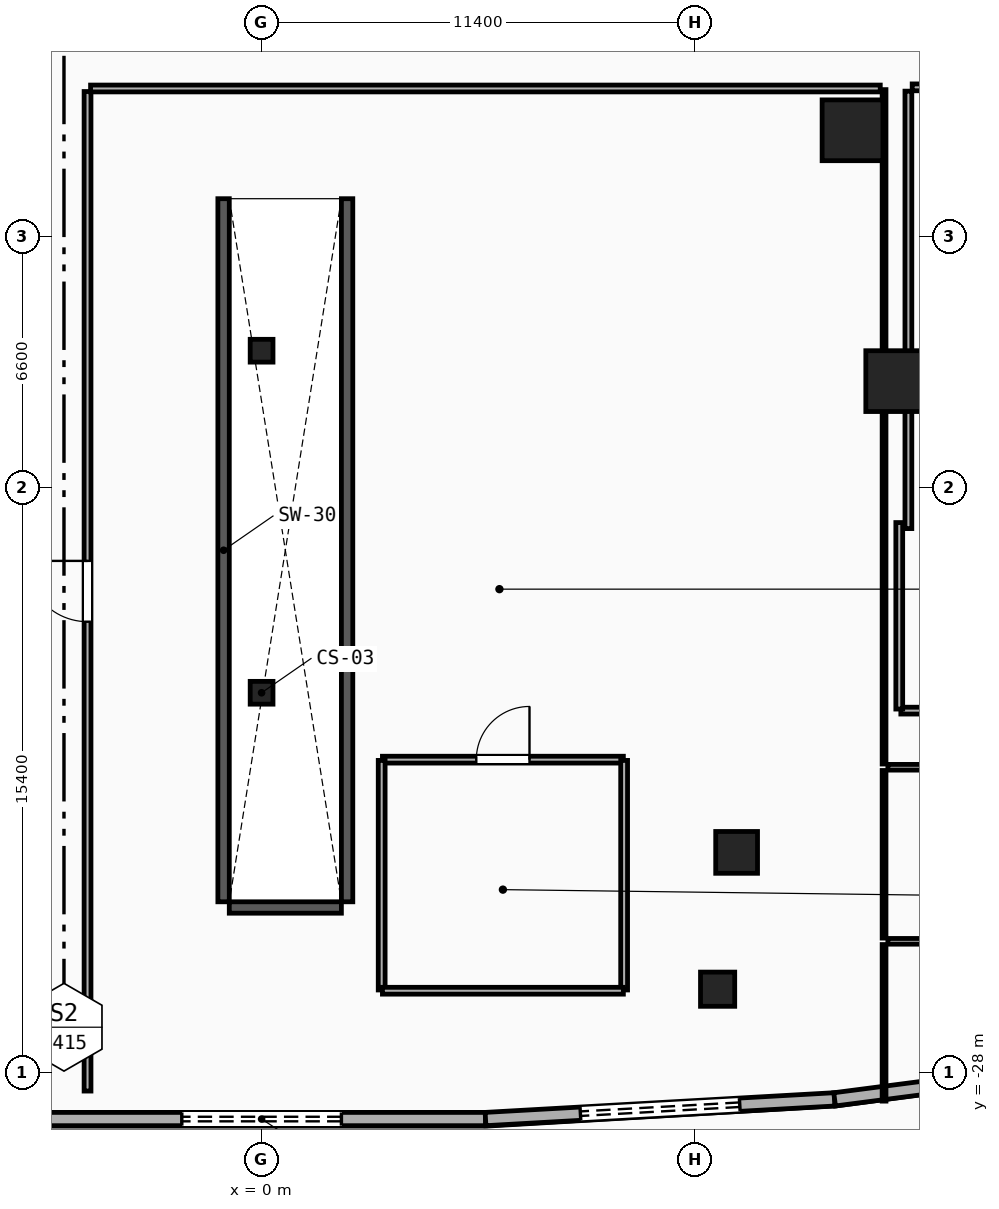
"""IFC4 building model, lengths in metres.
Left out: names, types, materials, properties, quantities, classifications, styles, units other than length and angle.
Written with IfcOpenShell. Run it as: python <this file> out.ifc"""

import sys

from ifc_helpers import new_model, si_unit, direction, frame, frame_2d, origin, origin_2d, place, context, subcontext, project, spatial, rectangle, hollow_rectangle, circle, extrude, element, fill, save


model = new_model("IFC4")
c1 = context("Model", 3, precision=1e-05, world=origin(), true_north=direction((0.0, 1.0)))
c2 = subcontext(c1, "Body", "Model", "MODEL_VIEW")
j1 = project(units=[si_unit("LENGTHUNIT", "METRE"), si_unit("PLANEANGLEUNIT", "RADIAN")], contexts=[c1])
p1 = place(None, origin())
s1 = spatial("IfcSite", under=j1, at=p1, CompositionType="ELEMENT")
p2 = place(p1, origin())
s2 = spatial("IfcBuilding", under=s1, at=p2, CompositionType="ELEMENT")
p3 = place(p2, origin())
s3 = spatial("IfcBuildingStorey", under=s2, at=p3, CompositionType="ELEMENT", Elevation=0.0)
for number, where, z_axis, x_axis in (
    (1, (15.55, -3.2, 0.0), (0.0, 0.0, 1.0), (1.0, 0.0, 0.0)),
    (2, (16.7, -9.8, 0.0), (0.0, 0.0, 1.0), (1.0, 0.0, 0.0)),
):
    element("IfcColumn", number, at=place(p3, frame(where, z_axis=z_axis, x_axis=x_axis)), inside=s3, PredefinedType="COLUMN", context=c2, shape_type="SweptSolid", body=[
        extrude(rectangle(XDim=1.6, YDim=1.6, at=origin_2d()), origin(), (0.0, 0.0, 1.0), 6.0),
    ])
for number, where, z_axis, x_axis in (
    (3, (0.0, -18.0, 0.0), (0.0, 0.0, 1.0), (1.0, 0.0, 0.0)),
    (4, (0.0, -9.0, 0.0), (0.0, 0.0, 1.0), (1.0, 0.0, 0.0)),
):
    element("IfcColumn", number, at=place(p3, frame(where, z_axis=z_axis, x_axis=x_axis)), inside=s3, PredefinedType="COLUMN", context=c2, shape_type="SweptSolid", body=[
        extrude(hollow_rectangle(XDim=0.6, YDim=0.6, WallThickness=0.032, at=origin_2d()), origin(), (0.0, 0.0, 1.0), 6.0),
    ])
p4 = place(p3, frame((12.5, -22.2, 0.0), z_axis=(0.0, 0.0, 1.0), x_axis=(1.0, 0.0, 0.0)))
e5 = element("IfcColumn", 5, at=p4, inside=s3, PredefinedType="PILASTER", context=c2, shape_type="SweptSolid", body=[
    extrude(circle(Radius=0.55, at=origin_2d()), origin(), (0.0, 0.0, 1.0), 6.0),
])
p5 = place(p3, frame((12.0, -25.8, 0.0), z_axis=(0.0, 0.0, 1.0), x_axis=(1.0, 0.0, 0.0)))
e6 = element("IfcColumn", 6, at=p5, inside=s3, PredefinedType="COLUMN", context=c2, shape_type="SweptSolid", body=[
    extrude(rectangle(XDim=0.9, YDim=0.9, at=origin_2d()), origin(), (0.0, 0.0, 1.0), 5.65),
])
for number, where, z_axis, x_axis in (
    (7, (-1.0, -23.5, 0.0), (0.0, 0.0, 1.0), (0.0, 1.0, 0.0)),
    (8, (2.25, -23.5, 0.0), (0.0, 0.0, 1.0), (0.0, 1.0, 0.0)),
):
    element("IfcWall", number, at=place(p3, frame(where, z_axis=z_axis, x_axis=x_axis)), inside=s3, PredefinedType="SHEAR", context=c2, shape_type="SweptSolid", body=[
        extrude(rectangle(XDim=18.5, YDim=0.3, at=frame_2d((9.25, 0.0))), origin(), (0.0, 0.0, 1.0), 5.65),
    ])
p6 = place(p3, frame((-0.85, -23.65, 0.0), z_axis=(0.0, 0.0, 1.0), x_axis=(1.0, 0.0, 0.0)))
e9 = element("IfcWall", 9, at=p6, inside=s3, PredefinedType="SHEAR", context=c2, shape_type="SweptSolid", body=[
    extrude(rectangle(XDim=2.95, YDim=0.3, at=frame_2d((1.475, 0.0))), origin(), (0.0, 0.0, 1.0), 5.65),
])
p7 = place(p3, frame((5.893, -29.216, 0.0), z_axis=(0.0, 0.0, 1.0), x_axis=(-1.0, 0.0, 0.0)))
e10 = element("IfcWall", 10, at=p7, inside=s3, PredefinedType="SOLIDWALL", context=c2, shape_type="SweptSolid", body=[
    extrude(rectangle(XDim=11.785, YDim=0.35, at=frame_2d((5.893, 0.0))), origin(), (0.0, 0.0, 1.0), 5.65),
])
p8 = place(p7, frame((3.792, 0.0, 0.0)))
e11 = element("IfcOpeningElement", 11, at=p8, cuts=e10, PredefinedType="OPENING", context=c2, shape_type="SweptSolid", body=[
    extrude(rectangle(XDim=4.2, YDim=2.8, at=frame_2d((2.1, 1.4))), frame((0.0, 0.185, 0.0), z_axis=(0.0, -1.0, 0.0), x_axis=(1.0, 0.0, 0.0)), (0.0, 0.0, 1.0), 0.37),
])
p9 = place(p3, frame((15.079, -28.698, 0.0), z_axis=(0.0, 0.0, 1.0), x_axis=(-0.998413463137, -0.056307695976, 0.0)))
e12 = element("IfcWall", 12, at=p9, inside=s3, PredefinedType="SOLIDWALL", context=c2, shape_type="SweptSolid", body=[
    extrude(rectangle(XDim=9.201, YDim=0.35, at=frame_2d((4.6, 0.0))), origin(), (0.0, 0.0, 1.0), 5.65),
])
p10 = place(p9, frame((2.5, 0.0, 0.0)))
e13 = element("IfcOpeningElement", 13, at=p10, cuts=e12, PredefinedType="OPENING", context=c2, shape_type="SweptSolid", body=[
    extrude(rectangle(XDim=4.2, YDim=2.8, at=frame_2d((2.1, 1.4))), frame((0.0, 0.185, 0.0), z_axis=(0.0, -1.0, 0.0), x_axis=(1.0, 0.0, 0.0)), (0.0, 0.0, 1.0), 0.37),
])
p11 = place(p3, frame((23.14, -27.652, 0.0), z_axis=(0.0, 0.0, 1.0), x_axis=(-0.991688106477, -0.128665067026, 0.0)))
e14 = element("IfcWall", 14, at=p11, inside=s3, PredefinedType="SOLIDWALL", context=c2, shape_type="SweptSolid", body=[
    extrude(rectangle(XDim=8.129, YDim=0.35, at=frame_2d((4.064, 0.0))), origin(), (0.0, 0.0, 1.0), 5.65),
])
p12 = place(p3, frame((17.02, -13.68, 0.0), z_axis=(0.0, 0.0, 1.0), x_axis=(0.0, 1.0, 0.0)))
e15 = element("IfcWall", 15, at=p12, inside=s3, PredefinedType="PARTITIONING", context=c2, shape_type="SweptSolid", body=[
    extrude(rectangle(XDim=11.51, YDim=0.18, at=frame_2d((5.755, 0.0))), origin(), (0.0, 0.0, 1.0), 5.65),
])
p13 = place(p3, frame((17.12, -2.07, 0.0), z_axis=(0.0, 0.0, 1.0), x_axis=(1.0, 0.0, 0.0)))
e16 = element("IfcWall", 16, at=p13, inside=s3, PredefinedType="PARTITIONING", context=c2, shape_type="SweptSolid", body=[
    extrude(rectangle(XDim=3.75, YDim=0.18, at=frame_2d((1.875, 0.0))), origin(), (0.0, 0.0, 1.0), 5.65),
])
p14 = place(p13, frame((1.4, 0.0, 0.0)))
e17 = element("IfcOpeningElement", 17, at=p14, cuts=e16, PredefinedType="OPENING", context=c2, shape_type="SweptSolid", body=[
    extrude(rectangle(XDim=0.95, YDim=2.1, at=frame_2d((0.475, 1.05))), frame((0.0, 0.1, 0.0), z_axis=(0.0, -1.0, 0.0), x_axis=(1.0, 0.0, 0.0)), (0.0, 0.0, 1.0), 0.2),
])
p15 = place(p3, frame((16.48, -19.96, 0.0), z_axis=(0.0, 0.0, 1.0), x_axis=(1.0, 0.0, 0.0)))
e18 = element("IfcWall", 18, at=p15, inside=s3, PredefinedType="PARTITIONING", context=c2, shape_type="SweptSolid", body=[
    extrude(rectangle(XDim=7.04, YDim=0.15, at=frame_2d((3.52, 0.0))), origin(), (0.0, 0.0, 1.0), 5.65),
])
p16 = place(p15, frame((3.02, 0.0, 0.0)))
e19 = element("IfcOpeningElement", 19, at=p16, cuts=e18, PredefinedType="OPENING", context=c2, shape_type="SweptSolid", body=[
    extrude(rectangle(XDim=1.0, YDim=2.15, at=frame_2d((0.5, 1.075))), frame((0.0, 0.085, 0.0), z_axis=(0.0, -1.0, 0.0), x_axis=(1.0, 0.0, 0.0)), (0.0, 0.0, 1.0), 0.17),
])
p17 = place(p3, frame((16.48, -24.54, 0.0), z_axis=(0.0, 0.0, 1.0), x_axis=(1.0, 0.0, 0.0)))
e20 = element("IfcWall", 20, at=p17, inside=s3, PredefinedType="PARTITIONING", context=c2, shape_type="SweptSolid", body=[
    extrude(rectangle(XDim=7.04, YDim=0.15, at=frame_2d((3.52, 0.0))), origin(), (0.0, 0.0, 1.0), 5.65),
])
p18 = place(p3, frame((3.18, -19.76, 0.0), z_axis=(0.0, 0.0, 1.0), x_axis=(1.0, 0.0, 0.0)))
e21 = element("IfcWall", 21, at=p18, inside=s3, PredefinedType="PARTITIONING", context=c2, shape_type="SweptSolid", body=[
    extrude(rectangle(XDim=6.34, YDim=0.18, at=frame_2d((3.17, 0.0))), origin(), (0.0, 0.0, 1.0), 5.65),
])
p19 = place(p18, frame((2.47, 0.0, 0.0)))
e22 = element("IfcOpeningElement", 22, at=p19, cuts=e21, PredefinedType="OPENING", context=c2, shape_type="SweptSolid", body=[
    extrude(rectangle(XDim=1.4, YDim=2.2, at=frame_2d((0.7, 1.1))), frame((0.0, 0.1, 0.0), z_axis=(0.0, -1.0, 0.0), x_axis=(1.0, 0.0, 0.0)), (0.0, 0.0, 1.0), 0.2),
])
for number, where, z_axis, x_axis in (
    (23, (3.16, -25.82, 0.0), (0.0, 0.0, 1.0), (0.0, 1.0, 0.0)),
    (24, (9.54, -25.82, 0.0), (0.0, 0.0, 1.0), (0.0, 1.0, 0.0)),
):
    element("IfcWall", number, at=place(p3, frame(where, z_axis=z_axis, x_axis=x_axis)), inside=s3, PredefinedType="PARTITIONING", context=c2, shape_type="SweptSolid", body=[
        extrude(rectangle(XDim=6.04, YDim=0.18, at=frame_2d((3.02, 0.0))), origin(), (0.0, 0.0, 1.0), 5.65),
    ])
p20 = place(p3, frame((3.18, -25.84, 0.0), z_axis=(0.0, 0.0, 1.0), x_axis=(1.0, 0.0, 0.0)))
e25 = element("IfcWall", 25, at=p20, inside=s3, PredefinedType="PARTITIONING", context=c2, shape_type="SweptSolid", body=[
    extrude(rectangle(XDim=6.34, YDim=0.18, at=frame_2d((3.17, 0.0))), origin(), (0.0, 0.0, 1.0), 5.65),
])
p21 = place(p3, frame((-4.58, -28.48, 0.0), z_axis=(0.0, 0.0, 1.0), x_axis=(0.0, 1.0, 0.0)))
e26 = element("IfcWall", 26, at=p21, inside=s3, PredefinedType="PARTITIONING", context=c2, shape_type="SweptSolid", body=[
    extrude(rectangle(XDim=26.3, YDim=0.18, at=frame_2d((13.15, 0.0))), origin(), (0.0, 0.0, 1.0), 5.65),
])
p22 = place(p21, frame((12.35, 0.0, 0.0)))
e27 = element("IfcOpeningElement", 27, at=p22, cuts=e26, PredefinedType="OPENING", context=c2, shape_type="SweptSolid", body=[
    extrude(rectangle(XDim=1.6, YDim=2.2, at=frame_2d((0.8, 1.1))), frame((0.0, 0.1, 0.0), z_axis=(0.0, -1.0, 0.0), x_axis=(1.0, 0.0, 0.0)), (0.0, 0.0, 1.0), 0.2),
])
p23 = place(p3, frame((-4.5, -2.1, 0.0), z_axis=(0.0, 0.0, 1.0), x_axis=(1.0, 0.0, 0.0)))
e28 = element("IfcWall", 28, at=p23, inside=s3, PredefinedType="PARTITIONING", context=c2, shape_type="SweptSolid", body=[
    extrude(rectangle(XDim=20.78, YDim=0.18, at=frame_2d((10.39, 0.0))), origin(), (0.0, 0.0, 1.0), 4.877),
])
p24 = place(p3, frame((16.822, -18.47, 0.0), z_axis=(0.0, 0.0, 1.0), x_axis=(1.0, 0.0, 0.0)))
e29 = element("IfcWall", 29, at=p24, inside=s3, PredefinedType="PARTITIONING", context=c2, shape_type="SweptSolid", body=[
    extrude(rectangle(XDim=12.878, YDim=0.18, at=frame_2d((6.439, 0.0))), origin(), (0.0, 0.0, 1.0), 4.877),
])
p25 = place(p24, frame((5.639, 0.0, 0.0)))
e30 = element("IfcOpeningElement", 30, at=p25, cuts=e29, PredefinedType="OPENING", context=c2, shape_type="SweptSolid", body=[
    extrude(rectangle(XDim=1.6, YDim=2.2, at=frame_2d((0.8, 1.1))), frame((0.0, 0.1, 0.0), z_axis=(0.0, -1.0, 0.0), x_axis=(1.0, 0.0, 0.0)), (0.0, 0.0, 1.0), 0.2),
])
p26 = place(p3, frame((16.78, -13.521, 0.0), z_axis=(0.0, 0.0, 1.0), x_axis=(0.0, -1.0, 0.0)))
e31 = element("IfcWall", 31, at=p26, inside=s3, PredefinedType="PARTITIONING", context=c2, shape_type="SweptSolid", body=[
    extrude(rectangle(XDim=4.907, YDim=0.18, at=frame_2d((2.454, 0.0))), origin(), (0.0, 0.0, 1.0), 5.65),
])
p27 = place(p3, frame((16.38, -28.745, 0.0), z_axis=(0.0, 0.0, 1.0), x_axis=(0.0, 1.0, 0.0)))
e32 = element("IfcWall", 32, at=p27, inside=s3, PredefinedType="PARTITIONING", context=c2, shape_type="SweptSolid", body=[
    extrude(rectangle(XDim=4.12, YDim=0.1, at=frame_2d((2.06, 0.0))), origin(), (0.0, 0.0, 1.0), 5.65),
])
p28 = place(p3, frame((16.38, -24.455, 0.0), z_axis=(0.0, 0.0, 1.0), x_axis=(0.0, 1.0, 0.0)))
e33 = element("IfcWall", 33, at=p28, inside=s3, PredefinedType="PARTITIONING", context=c2, shape_type="SweptSolid", body=[
    extrude(rectangle(XDim=4.41, YDim=0.1, at=frame_2d((2.205, 0.0))), origin(), (0.0, 0.0, 1.0), 5.65),
])
p29 = place(p3, frame((16.38, -19.875, 0.0), z_axis=(0.0, 0.0, 1.0), x_axis=(0.0, 1.0, 0.0)))
e34 = element("IfcWall", 34, at=p29, inside=s3, PredefinedType="PARTITIONING", context=c2, shape_type="SweptSolid", body=[
    extrude(rectangle(XDim=17.745, YDim=0.1, at=frame_2d((8.873, 0.0))), origin(), (0.0, 0.0, 1.0), 4.877),
])
p30 = place(p8, origin())
e35 = element("IfcDoor", 35, at=p30, inside=s3, OperationType="ROLLINGUP", PredefinedType="GATE", context=c2, shape_type="SweptSolid", body=[
    extrude(rectangle(XDim=4.2, YDim=2.8, at=frame_2d((2.1, 1.4))), frame((0.0, 0.025, 0.0), z_axis=(0.0, -1.0, 0.0), x_axis=(1.0, 0.0, 0.0)), (0.0, 0.0, 1.0), 0.05),
])
fill(e11, e35)
p31 = place(p10, origin())
e36 = element("IfcDoor", 36, at=p31, inside=s3, OperationType="ROLLINGUP", PredefinedType="GATE", context=c2, shape_type="SweptSolid", body=[
    extrude(rectangle(XDim=4.2, YDim=2.8, at=frame_2d((2.1, 1.4))), frame((0.0, 0.025, 0.0), z_axis=(0.0, -1.0, 0.0), x_axis=(1.0, 0.0, 0.0)), (0.0, 0.0, 1.0), 0.05),
])
fill(e13, e36)
p32 = place(p22, origin())
e37 = element("IfcDoor", 37, at=p32, inside=s3, OperationType="SINGLE_SWING_RIGHT", PredefinedType="DOOR", context=c2, shape_type="SweptSolid", body=[
    extrude(rectangle(XDim=1.6, YDim=2.2, at=frame_2d((0.8, 1.1))), frame((0.0, 0.025, 0.0), z_axis=(0.0, -1.0, 0.0), x_axis=(1.0, 0.0, 0.0)), (0.0, 0.0, 1.0), 0.05),
])
fill(e27, e37)
p33 = place(p19, origin())
e38 = element("IfcDoor", 38, at=p33, inside=s3, OperationType="SINGLE_SWING_RIGHT", PredefinedType="DOOR", context=c2, shape_type="SweptSolid", body=[
    extrude(rectangle(XDim=1.4, YDim=2.2, at=frame_2d((0.7, 1.1))), frame((0.0, 0.025, 0.0), z_axis=(0.0, -1.0, 0.0), x_axis=(1.0, 0.0, 0.0)), (0.0, 0.0, 1.0), 0.05),
])
fill(e22, e38)
save(model, sys.argv[1])
